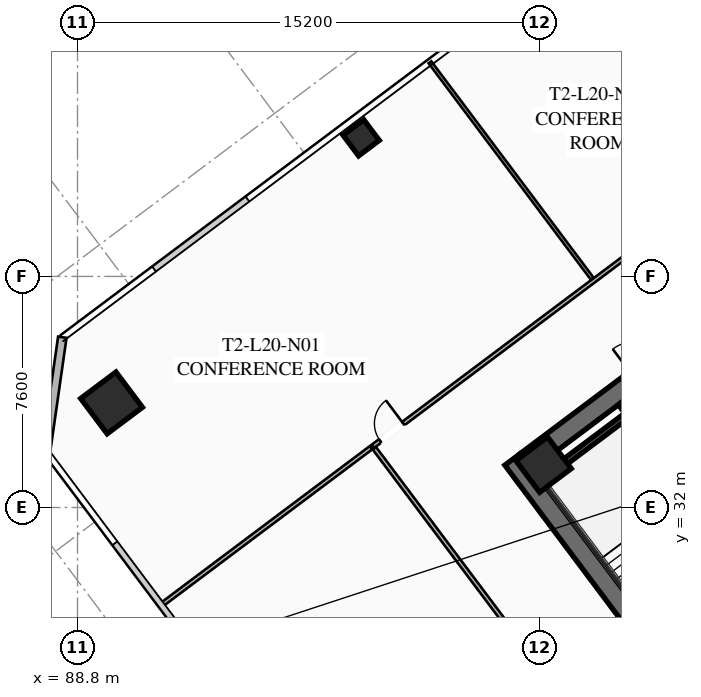
"""IFC4 building model, lengths in metres.
Left out: names, types, materials, properties, quantities, classifications, styles, units other than length and angle.
Written with IfcOpenShell. Run it as: python <this file> out.ifc"""

import sys

from ifc_helpers import new_model, si_unit, direction, frame, frame_2d, origin, origin_2d, place, context, subcontext, project, spatial, rectangle, hollow_rectangle, extrude, element, fill, save


model = new_model("IFC4")
c1 = context("Model", 3, precision=1e-05, world=origin(), true_north=direction((0.0, 1.0)))
c2 = subcontext(c1, "Body", "Model", "MODEL_VIEW")
j1 = project(units=[si_unit("LENGTHUNIT", "METRE"), si_unit("PLANEANGLEUNIT", "RADIAN")], contexts=[c1])
p1 = place(None, origin())
s1 = spatial("IfcSite", under=j1, at=p1, CompositionType="ELEMENT")
p2 = place(p1, origin())
s2 = spatial("IfcBuilding", under=s1, at=p2, CompositionType="ELEMENT")
p3 = place(p2, frame((0.0, 0.0, 77.85)))
s3 = spatial("IfcBuildingStorey", under=s2, at=p3, CompositionType="ELEMENT", Elevation=77.85)
p4 = place(p3, frame((112.476, 21.107, 0.0), z_axis=(0.0, 0.0, 1.0), x_axis=(-0.600005007985, 0.799996243986, 0.0)))
e1 = element("IfcWall", 1, at=p4, inside=s3, PredefinedType="SHEAR", context=c2, shape_type="SweptSolid", body=[
    extrude(rectangle(XDim=15.6, YDim=0.65, at=frame_2d((7.8, 0.0))), origin(), (0.0, 0.0, 1.0), 3.55),
])
p5 = place(p3, frame((103.571, 33.522, 0.0), z_axis=(0.0, 0.0, 1.0), x_axis=(0.799998028465, 0.600002628705, 0.0)))
e2 = element("IfcWall", 2, at=p5, inside=s3, PredefinedType="SHEAR", context=c2, shape_type="SweptSolid", body=[
    extrude(rectangle(XDim=14.86, YDim=0.65, at=frame_2d((7.43, 0.0))), origin(), (0.0, 0.0, 1.0), 3.55),
])
p6 = place(p5, frame((4.48, 0.0, 0.0)))
e3 = element("IfcOpeningElement", 3, at=p6, cuts=e2, PredefinedType="OPENING", context=c2, shape_type="SweptSolid", body=[
    extrude(rectangle(XDim=1.25, YDim=2.25, at=frame_2d((0.625, 1.125))), frame((0.0, 0.335, 0.0), z_axis=(0.0, -1.0, 0.0), x_axis=(1.0, 0.0, 0.0)), (0.0, 0.0, 1.0), 0.67),
])
p7 = place(p5, frame((9.53, 0.0, 0.0)))
e4 = element("IfcOpeningElement", 4, at=p7, cuts=e2, PredefinedType="OPENING", context=c2, shape_type="SweptSolid", body=[
    extrude(rectangle(XDim=1.25, YDim=2.25, at=frame_2d((0.625, 1.125))), frame((0.0, 0.335, 0.0), z_axis=(0.0, -1.0, 0.0), x_axis=(1.0, 0.0, 0.0)), (0.0, 0.0, 1.0), 0.67),
])
p8 = place(p3, frame((104.13, 33.41, 0.0), z_axis=(0.0, 0.0, 1.0), x_axis=(0.799999996291, 0.600000004945, 0.0)))
e5 = element("IfcColumn", 5, at=p8, inside=s3, PredefinedType="COLUMN", context=c2, shape_type="SweptSolid", body=[
    extrude(hollow_rectangle(XDim=1.3, YDim=1.3, WallThickness=0.05, at=origin_2d()), origin(), (0.0, 0.0, 1.0), 3.35),
])
p9 = place(p3, frame((89.92, 35.44, 0.0), z_axis=(0.0, 0.0, 1.0), x_axis=(0.799999996291, 0.600000004945, 0.0)))
e6 = element("IfcColumn", 6, at=p9, inside=s3, PredefinedType="COLUMN", context=c2, shape_type="SweptSolid", body=[
    extrude(hollow_rectangle(XDim=1.45, YDim=1.45, WallThickness=0.055, at=origin_2d()), origin(), (0.0, 0.0, 1.0), 3.35),
])
p10 = place(p3, frame((98.13, 44.16, 0.0), z_axis=(0.0, 0.0, 1.0), x_axis=(0.799999996291, 0.600000004945, 0.0)))
e7 = element("IfcColumn", 7, at=p10, inside=s3, PredefinedType="COLUMN", context=c2, shape_type="SweptSolid", body=[
    extrude(hollow_rectangle(XDim=0.85, YDim=0.85, WallThickness=0.035, at=origin_2d()), origin(), (0.0, 0.0, 1.0), 3.35),
])
p11 = place(p3, frame((87.76, 33.82, 0.0), z_axis=(0.0, 0.0, 1.0), x_axis=(0.141430307517, 0.989948214866, 0.0)))
e8 = element("IfcWall", 8, at=p11, inside=s3, PredefinedType="SOLIDWALL", context=c2, shape_type="SweptSolid", body=[
    extrude(rectangle(XDim=3.818, YDim=0.28, at=frame_2d((1.909, 0.0))), origin(), (0.0, 0.0, 1.0), 3.35),
])
p12 = place(p3, frame((111.44, 29.08, 0.0), z_axis=(0.0, 0.0, 1.0), x_axis=(-0.600009827119, 0.799992629566, 0.0)))
e9 = element("IfcWall", 9, at=p12, inside=s3, PredefinedType="SHEAR", context=c2, shape_type="SweptSolid", body=[
    extrude(rectangle(XDim=7.95, YDim=0.2, at=frame_2d((3.975, 0.0))), origin(), (0.0, 0.0, 1.0), 3.35),
])
p13 = place(p12, frame((0.45, 0.0, 0.0)))
e10 = element("IfcOpeningElement", 10, at=p13, cuts=e9, PredefinedType="OPENING", context=c2, shape_type="SweptSolid", body=[
    extrude(rectangle(XDim=1.15, YDim=2.2, at=frame_2d((0.575, 1.1))), frame((0.0, 0.11, 0.0), z_axis=(0.0, -1.0, 0.0), x_axis=(1.0, 0.0, 0.0)), (0.0, 0.0, 1.0), 0.22),
])
p14 = place(p3, frame((104.036, 32.902, 0.0), z_axis=(0.0, 0.0, 1.0), x_axis=(0.800039270442, 0.59994763584, 0.0)))
e11 = element("IfcWall", 11, at=p14, inside=s3, PredefinedType="SHEAR", context=c2, shape_type="SweptSolid", body=[
    extrude(rectangle(XDim=3.73, YDim=0.2, at=frame_2d((1.865, 0.0))), origin(), (0.0, 0.0, 1.0), 3.35),
])
p15 = place(p3, frame((98.516, 34.012, 0.0), z_axis=(0.0, 0.0, 1.0), x_axis=(0.8, 0.6, 0.0)))
e12 = element("IfcWall", 12, at=p15, inside=s3, PredefinedType="PARTITIONING", context=c2, shape_type="SweptSolid", body=[
    extrude(rectangle(XDim=28.23, YDim=0.135, at=frame_2d((14.115, 0.0))), origin(), (0.0, 0.0, 1.0), 2.703),
])
p16 = place(p15, frame((0.3, 0.0, 0.0)))
e13 = element("IfcOpeningElement", 13, at=p16, cuts=e12, PredefinedType="OPENING", context=c2, shape_type="SweptSolid", body=[
    extrude(rectangle(XDim=0.95, YDim=2.05, at=frame_2d((0.475, 1.025))), frame((0.0, 0.077, 0.0), z_axis=(0.0, -1.0, 0.0), x_axis=(1.0, 0.0, 0.0)), (0.0, 0.0, 1.0), 0.155),
])
p17 = place(p15, frame((11.004, 0.0, 0.0)))
e14 = element("IfcOpeningElement", 14, at=p17, cuts=e12, PredefinedType="OPENING", context=c2, shape_type="SweptSolid", body=[
    extrude(rectangle(XDim=0.95, YDim=2.05, at=frame_2d((0.475, 1.025))), frame((0.0, 0.077, 0.0), z_axis=(0.0, -1.0, 0.0), x_axis=(1.0, 0.0, 0.0)), (0.0, 0.0, 1.0), 0.155),
])
p18 = place(p15, frame((26.98, 0.0, 0.0)))
e15 = element("IfcOpeningElement", 15, at=p18, cuts=e12, PredefinedType="OPENING", context=c2, shape_type="SweptSolid", body=[
    extrude(rectangle(XDim=0.95, YDim=2.05, at=frame_2d((0.475, 1.025))), frame((0.0, 0.077, 0.0), z_axis=(0.0, -1.0, 0.0), x_axis=(1.0, 0.0, 0.0)), (0.0, 0.0, 1.0), 0.155),
])
for number, where, z_axis, x_axis in (
    (16, (105.732, 39.524, 0.0), (0.0, 0.0, 1.0), (-0.6, 0.8, 0.0)),
    (17, (111.012, 43.484, 0.0), (0.0, 0.0, 1.0), (-0.6, 0.8, 0.0)),
):
    element("IfcWall", number, at=place(p3, frame(where, z_axis=z_axis, x_axis=x_axis)), inside=s3, PredefinedType="PARTITIONING", context=c2, shape_type="SweptSolid", body=[
        extrude(rectangle(XDim=8.9, YDim=0.11, at=frame_2d((4.45, 0.0))), origin(), (0.0, 0.0, 1.0), 2.703),
    ])
p19 = place(p3, frame((111.548, 16.636, 0.0), z_axis=(0.0, 0.0, 1.0), x_axis=(-0.600003610192, 0.799997292343, 0.0)))
e18 = element("IfcWall", 18, at=p19, inside=s3, PredefinedType="PARTITIONING", context=c2, shape_type="SweptSolid", body=[
    extrude(rectangle(XDim=21.64, YDim=0.135, at=frame_2d((10.82, 0.0))), origin(), (0.0, 0.0, 1.0), 2.703),
])
p20 = place(p19, frame((0.3, 0.0, 0.0)))
e19 = element("IfcOpeningElement", 19, at=p20, cuts=e18, PredefinedType="OPENING", context=c2, shape_type="SweptSolid", body=[
    extrude(rectangle(XDim=0.95, YDim=2.05, at=frame_2d((0.475, 1.025))), frame((0.0, 0.077, 0.0), z_axis=(0.0, -1.0, 0.0), x_axis=(1.0, 0.0, 0.0)), (0.0, 0.0, 1.0), 0.155),
])
p21 = place(p3, frame((98.452, 33.964, 0.0), z_axis=(0.0, 0.0, 1.0), x_axis=(-0.799993202584, -0.600009063115, 0.0)))
e20 = element("IfcWall", 20, at=p21, inside=s3, PredefinedType="PARTITIONING", context=c2, shape_type="SweptSolid", body=[
    extrude(rectangle(XDim=8.62, YDim=0.135, at=frame_2d((4.31, 0.0))), origin(), (0.0, 0.0, 1.0), 2.703),
])
p22 = place(p16, origin())
e21 = element("IfcDoor", 21, at=p22, inside=s3, OperationType="SINGLE_SWING_RIGHT", PredefinedType="DOOR", context=c2, shape_type="SweptSolid", body=[
    extrude(rectangle(XDim=0.95, YDim=2.05, at=frame_2d((0.475, 1.025))), frame((0.0, 0.025, 0.0), z_axis=(0.0, -1.0, 0.0), x_axis=(1.0, 0.0, 0.0)), (0.0, 0.0, 1.0), 0.05),
])
fill(e13, e21)
save(model, sys.argv[1])
